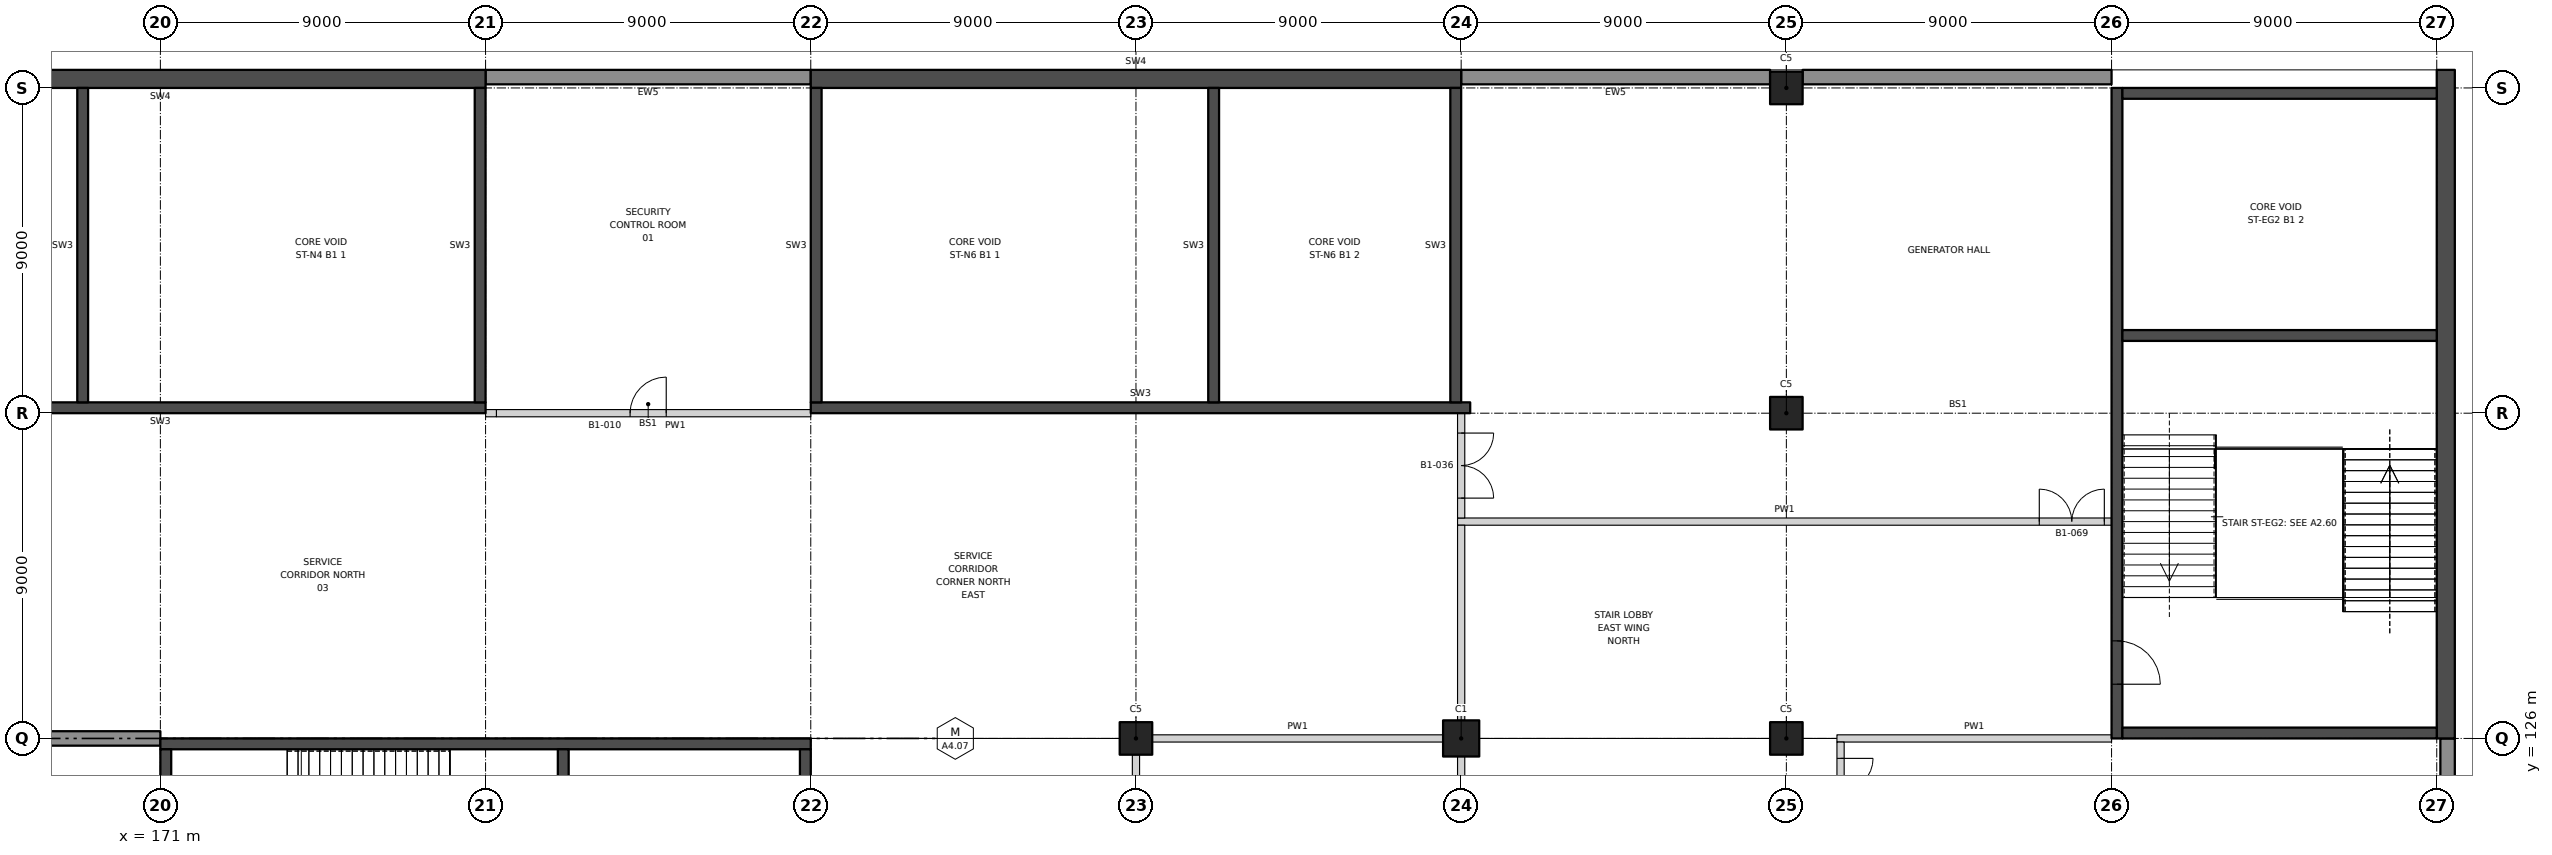
"""IFC4 building model, lengths in metres.
Left out: names, types, materials, properties, quantities, classifications, styles, units other than length and angle.
Written with IfcOpenShell. Run it as: python <this file> out.ifc"""

import sys

from ifc_helpers import new_model, si_unit, direction, frame, frame_2d, origin, origin_2d, place, context, subcontext, project, spatial, rectangle, extrude, element, fill, save


model = new_model("IFC4")
c1 = context("Model", 3, precision=1e-05, world=origin(), true_north=direction((0.0, 1.0)))
c2 = subcontext(c1, "Body", "Model", "MODEL_VIEW")
j1 = project(units=[si_unit("LENGTHUNIT", "METRE"), si_unit("PLANEANGLEUNIT", "RADIAN")], contexts=[c1])
p1 = place(None, origin())
s1 = spatial("IfcSite", under=j1, at=p1, CompositionType="ELEMENT")
p2 = place(p1, origin())
s2 = spatial("IfcBuilding", under=s1, at=p2, CompositionType="ELEMENT")
p3 = place(p2, frame((0.0, 0.0, -6.0)))
s3 = spatial("IfcBuildingStorey", under=s2, at=p3, CompositionType="ELEMENT", Elevation=-6.0)
p4 = place(p3, frame((207.0, 126.0, 0.0), z_axis=(0.0, 0.0, 1.0), x_axis=(1.0, 0.0, 0.0)))
e1 = element("IfcColumn", 1, at=p4, inside=s3, PredefinedType="COLUMN", context=c2, shape_type="SweptSolid", body=[
    extrude(rectangle(XDim=1.0, YDim=1.0, at=origin_2d()), origin(), (0.0, 0.0, 1.0), 6.0),
])
for number, where, z_axis, x_axis in (
    (2, (198.0, 126.0, 0.0), (0.0, 0.0, 1.0), (1.0, 0.0, 0.0)),
    (3, (216.0, 126.0, 0.0), (0.0, 0.0, 1.0), (1.0, 0.0, 0.0)),
    (4, (216.0, 135.0, 0.0), (0.0, 0.0, 1.0), (1.0, 0.0, 0.0)),
    (5, (216.0, 144.0, 0.0), (0.0, 0.0, 1.0), (1.0, 0.0, 0.0)),
):
    element("IfcColumn", number, at=place(p3, frame(where, z_axis=z_axis, x_axis=x_axis)), inside=s3, PredefinedType="COLUMN", context=c2, shape_type="SweptSolid", body=[
        extrude(rectangle(XDim=0.9, YDim=0.9, at=origin_2d()), origin(), (0.0, 0.0, 1.0), 6.0),
    ])
p5 = place(p3, frame((171.0, 126.0, 0.0), z_axis=(0.0, 0.0, 1.0), x_axis=(-1.0, 0.0, 0.0)))
e6 = element("IfcWall", 6, at=p5, inside=s3, PredefinedType="SOLIDWALL", context=c2, shape_type="SweptSolid", body=[
    extrude(rectangle(XDim=39.8, YDim=0.4, at=frame_2d((19.9, 0.0))), origin(), (0.0, 0.0, 1.0), 6.0),
])
p6 = place(p3, frame((198.45, 126.0, 0.0), z_axis=(0.0, 0.0, 1.0), x_axis=(1.0, 0.0, 0.0)))
e7 = element("IfcWall", 7, at=p6, inside=s3, PredefinedType="PARTITIONING", context=c2, shape_type="SweptSolid", body=[
    extrude(rectangle(XDim=8.05, YDim=0.2, at=frame_2d((4.025, 0.0))), origin(), (0.0, 0.0, 1.0), 4.65),
])
p7 = place(p3, frame((217.4, 126.0, 0.0), z_axis=(0.0, 0.0, 1.0), x_axis=(1.0, 0.0, 0.0)))
e8 = element("IfcWall", 8, at=p7, inside=s3, PredefinedType="PARTITIONING", context=c2, shape_type="SweptSolid", body=[
    extrude(rectangle(XDim=7.6, YDim=0.2, at=frame_2d((3.8, 0.0))), origin(), (0.0, 0.0, 1.0), 4.65),
])
p8 = place(p3, frame((206.9, 132.0, 0.0), z_axis=(0.0, 0.0, 1.0), x_axis=(1.0, 0.0, 0.0)))
e9 = element("IfcWall", 9, at=p8, inside=s3, PredefinedType="PARTITIONING", context=c2, shape_type="SweptSolid", body=[
    extrude(rectangle(XDim=18.1, YDim=0.2, at=frame_2d((9.05, 0.0))), origin(), (0.0, 0.0, 1.0), 6.0),
])
p9 = place(p8, frame((16.1, 0.0, 0.0)))
e10 = element("IfcOpeningElement", 10, at=p9, cuts=e9, PredefinedType="OPENING", context=c2, shape_type="SweptSolid", body=[
    extrude(rectangle(XDim=1.8, YDim=2.1, at=frame_2d((0.9, 1.05))), frame((0.0, 0.11, 0.0), z_axis=(0.0, -1.0, 0.0), x_axis=(1.0, 0.0, 0.0)), (0.0, 0.0, 1.0), 0.22),
])
p10 = place(p3, frame((180.3, 135.0, 0.0), z_axis=(0.0, 0.0, 1.0), x_axis=(1.0, 0.0, 0.0)))
e11 = element("IfcWall", 11, at=p10, inside=s3, PredefinedType="PARTITIONING", context=c2, shape_type="SweptSolid", body=[
    extrude(rectangle(XDim=8.7, YDim=0.2, at=frame_2d((4.35, 0.0))), origin(), (0.0, 0.0, 1.0), 4.55),
])
p11 = place(p10, frame((3.7, 0.0, 0.0)))
e12 = element("IfcOpeningElement", 12, at=p11, cuts=e11, PredefinedType="OPENING", context=c2, shape_type="SweptSolid", body=[
    extrude(rectangle(XDim=1.0, YDim=2.1, at=frame_2d((0.5, 1.05))), frame((0.0, 0.11, 0.0), z_axis=(0.0, -1.0, 0.0), x_axis=(1.0, 0.0, 0.0)), (0.0, 0.0, 1.0), 0.22),
])
p12 = place(p3, frame((198.0, 117.45, 0.0), z_axis=(0.0, 0.0, 1.0), x_axis=(0.0, 1.0, 0.0)))
e13 = element("IfcWall", 13, at=p12, inside=s3, PredefinedType="PARTITIONING", context=c2, shape_type="SweptSolid", body=[
    extrude(rectangle(XDim=8.1, YDim=0.2, at=frame_2d((4.05, 0.0))), origin(), (0.0, 0.0, 1.0), 4.65),
])
p13 = place(p12, frame((3.15, 0.0, 0.0)))
e14 = element("IfcOpeningElement", 14, at=p13, cuts=e13, PredefinedType="OPENING", context=c2, shape_type="SweptSolid", body=[
    extrude(rectangle(XDim=1.8, YDim=2.1, at=frame_2d((0.9, 1.05))), frame((0.0, 0.11, 0.0), z_axis=(0.0, -1.0, 0.0), x_axis=(1.0, 0.0, 0.0)), (0.0, 0.0, 1.0), 0.22),
])
p14 = place(p3, frame((207.0, 117.5, 0.0), z_axis=(0.0, 0.0, 1.0), x_axis=(0.0, 1.0, 0.0)))
e15 = element("IfcWall", 15, at=p14, inside=s3, PredefinedType="PARTITIONING", context=c2, shape_type="SweptSolid", body=[
    extrude(rectangle(XDim=8.0, YDim=0.2, at=frame_2d((4.0, 0.0))), origin(), (0.0, 0.0, 1.0), 4.65),
])
p15 = place(p3, frame((207.0, 126.5, 0.0), z_axis=(0.0, 0.0, 1.0), x_axis=(0.0, 1.0, 0.0)))
e16 = element("IfcWall", 16, at=p15, inside=s3, PredefinedType="PARTITIONING", context=c2, shape_type="SweptSolid", body=[
    extrude(rectangle(XDim=5.4, YDim=0.2, at=frame_2d((2.7, 0.0))), origin(), (0.0, 0.0, 1.0), 4.65),
])
p16 = place(p3, frame((207.0, 132.1, 0.0), z_axis=(0.0, 0.0, 1.0), x_axis=(0.0, 1.0, 0.0)))
e17 = element("IfcWall", 17, at=p16, inside=s3, PredefinedType="PARTITIONING", context=c2, shape_type="SweptSolid", body=[
    extrude(rectangle(XDim=2.9, YDim=0.2, at=frame_2d((1.45, 0.0))), origin(), (0.0, 0.0, 1.0), 4.65),
])
p17 = place(p16, frame((0.55, 0.0, 0.0)))
e18 = element("IfcOpeningElement", 18, at=p17, cuts=e17, PredefinedType="OPENING", context=c2, shape_type="SweptSolid", body=[
    extrude(rectangle(XDim=1.8, YDim=2.1, at=frame_2d((0.9, 1.05))), frame((0.0, 0.11, 0.0), z_axis=(0.0, -1.0, 0.0), x_axis=(1.0, 0.0, 0.0)), (0.0, 0.0, 1.0), 0.22),
])
p18 = place(p3, frame((217.5, 108.1, 0.0), z_axis=(0.0, 0.0, 1.0), x_axis=(0.0, 1.0, 0.0)))
e19 = element("IfcWall", 19, at=p18, inside=s3, PredefinedType="PARTITIONING", context=c2, shape_type="SweptSolid", body=[
    extrude(rectangle(XDim=17.8, YDim=0.2, at=frame_2d((8.9, 0.0))), origin(), (0.0, 0.0, 1.0), 6.0),
])
p19 = place(p18, frame((3.5, 0.0, 0.0)))
e20 = element("IfcOpeningElement", 20, at=p19, cuts=e19, PredefinedType="OPENING", context=c2, shape_type="SweptSolid", body=[
    extrude(rectangle(XDim=1.8, YDim=2.1, at=frame_2d((0.9, 1.05))), frame((0.0, 0.11, 0.0), z_axis=(0.0, -1.0, 0.0), x_axis=(1.0, 0.0, 0.0)), (0.0, 0.0, 1.0), 0.22),
])
p20 = place(p18, frame((15.548, 0.0, 0.0)))
e21 = element("IfcOpeningElement", 21, at=p20, cuts=e19, PredefinedType="OPENING", context=c2, shape_type="SweptSolid", body=[
    extrude(rectangle(XDim=1.8, YDim=2.1, at=frame_2d((0.9, 1.05))), frame((0.0, 0.11, 0.0), z_axis=(0.0, -1.0, 0.0), x_axis=(1.0, 0.0, 0.0)), (0.0, 0.0, 1.0), 0.22),
])
p21 = place(p3, frame((234.3, 117.45, 0.0), z_axis=(0.0, 0.0, 1.0), x_axis=(0.0, 1.0, 0.0)))
e22 = element("IfcWall", 22, at=p21, inside=s3, PredefinedType="SOLIDWALL", context=c2, shape_type="SweptSolid", body=[
    extrude(rectangle(XDim=8.55, YDim=0.4, at=frame_2d((4.275, 0.0))), origin(), (0.0, 0.0, 1.0), 6.0),
])
p22 = place(p3, frame((189.0, 144.3, 0.0), z_axis=(0.0, 0.0, 1.0), x_axis=(-1.0, 0.0, 0.0)))
e23 = element("IfcWall", 23, at=p22, inside=s3, PredefinedType="SOLIDWALL", context=c2, shape_type="SweptSolid", body=[
    extrude(rectangle(XDim=9.0, YDim=0.4, at=frame_2d((4.5, 0.0))), origin(), (0.0, 0.0, 1.0), 6.0),
])
for number, where, z_axis, x_axis in (
    (24, (215.55, 144.3, 0.0), (0.0, 0.0, 1.0), (-1.0, 0.0, 0.0)),
    (25, (225.0, 144.3, 0.0), (0.0, 0.0, 1.0), (-1.0, 0.0, 0.0)),
):
    element("IfcWall", number, at=place(p3, frame(where, z_axis=z_axis, x_axis=x_axis)), inside=s3, PredefinedType="SOLIDWALL", context=c2, shape_type="SweptSolid", body=[
        extrude(rectangle(XDim=8.55, YDim=0.4, at=frame_2d((4.275, 0.0))), origin(), (0.0, 0.0, 1.0), 6.0),
    ])
p23 = place(p3, frame((180.0, 135.15, 0.0), z_axis=(0.0, 0.0, 1.0), x_axis=(-1.0, 0.0, 0.0)))
e26 = element("IfcWall", 26, at=p23, inside=s3, PredefinedType="SHEAR", context=c2, shape_type="SweptSolid", body=[
    extrude(rectangle(XDim=18.0, YDim=0.3, at=frame_2d((9.0, 0.0))), origin(), (0.0, 0.0, 1.0), 6.0),
])
p24 = place(p3, frame((180.0, 144.25, 0.0), z_axis=(0.0, 0.0, 1.0), x_axis=(-1.0, 0.0, 0.0)))
e27 = element("IfcWall", 27, at=p24, inside=s3, PredefinedType="SHEAR", context=c2, shape_type="SweptSolid", body=[
    extrude(rectangle(XDim=18.0, YDim=0.5, at=frame_2d((9.0, 0.0))), origin(), (0.0, 0.0, 1.0), 6.0),
])
for number, where, z_axis, x_axis in (
    (28, (179.85, 135.3, 0.0), (0.0, 0.0, 1.0), (0.0, 1.0, 0.0)),
    (29, (168.85, 135.3, 0.0), (0.0, 0.0, 1.0), (0.0, 1.0, 0.0)),
):
    element("IfcWall", number, at=place(p3, frame(where, z_axis=z_axis, x_axis=x_axis)), inside=s3, PredefinedType="SHEAR", context=c2, shape_type="SweptSolid", body=[
        extrude(rectangle(XDim=8.7, YDim=0.3, at=frame_2d((4.35, 0.0))), origin(), (0.0, 0.0, 1.0), 6.0),
    ])
p25 = place(p3, frame((189.0, 135.15, 0.0), z_axis=(0.0, 0.0, 1.0), x_axis=(1.0, 0.0, 0.0)))
e30 = element("IfcWall", 30, at=p25, inside=s3, PredefinedType="SHEAR", context=c2, shape_type="SweptSolid", body=[
    extrude(rectangle(XDim=18.25, YDim=0.3, at=frame_2d((9.125, 0.0))), origin(), (0.0, 0.0, 1.0), 6.0),
])
p26 = place(p3, frame((189.0, 144.25, 0.0), z_axis=(0.0, 0.0, 1.0), x_axis=(1.0, 0.0, 0.0)))
e31 = element("IfcWall", 31, at=p26, inside=s3, PredefinedType="SHEAR", context=c2, shape_type="SweptSolid", body=[
    extrude(rectangle(XDim=18.0, YDim=0.5, at=frame_2d((9.0, 0.0))), origin(), (0.0, 0.0, 1.0), 6.0),
])
for number, where, z_axis, x_axis in (
    (32, (189.15, 135.3, 0.0), (0.0, 0.0, 1.0), (0.0, 1.0, 0.0)),
    (33, (206.85, 135.3, 0.0), (0.0, 0.0, 1.0), (0.0, 1.0, 0.0)),
    (34, (200.15, 135.3, 0.0), (0.0, 0.0, 1.0), (0.0, 1.0, 0.0)),
):
    element("IfcWall", number, at=place(p3, frame(where, z_axis=z_axis, x_axis=x_axis)), inside=s3, PredefinedType="SHEAR", context=c2, shape_type="SweptSolid", body=[
        extrude(rectangle(XDim=8.7, YDim=0.3, at=frame_2d((4.35, 0.0))), origin(), (0.0, 0.0, 1.0), 6.0),
    ])
p27 = place(p3, frame((171.0, 125.85, 0.0), z_axis=(0.0, 0.0, 1.0), x_axis=(1.0, 0.0, 0.0)))
e35 = element("IfcWall", 35, at=p27, inside=s3, PredefinedType="SHEAR", context=c2, shape_type="SweptSolid", body=[
    extrude(rectangle(XDim=18.0, YDim=0.3, at=frame_2d((9.0, 0.0))), origin(), (0.0, 0.0, 1.0), 6.0),
])
for number, where, z_axis, x_axis in (
    (36, (171.15, 117.3, 0.0), (0.0, 0.0, 1.0), (0.0, 1.0, 0.0)),
    (37, (188.85, 117.3, 0.0), (0.0, 0.0, 1.0), (0.0, 1.0, 0.0)),
    (38, (182.15, 117.3, 0.0), (0.0, 0.0, 1.0), (0.0, 1.0, 0.0)),
):
    element("IfcWall", number, at=place(p3, frame(where, z_axis=z_axis, x_axis=x_axis)), inside=s3, PredefinedType="SHEAR", context=c2, shape_type="SweptSolid", body=[
        extrude(rectangle(XDim=8.4, YDim=0.3, at=frame_2d((4.2, 0.0))), origin(), (0.0, 0.0, 1.0), 6.0),
    ])
p28 = place(p3, frame((225.15, 126.0, 0.0), z_axis=(0.0, 0.0, 1.0), x_axis=(0.0, 1.0, 0.0)))
e39 = element("IfcWall", 39, at=p28, inside=s3, PredefinedType="SHEAR", context=c2, shape_type="SweptSolid", body=[
    extrude(rectangle(XDim=18.0, YDim=0.3, at=frame_2d((9.0, 0.0))), origin(), (0.0, 0.0, 1.0), 6.0),
])
p29 = place(p28, frame((1.5, 0.0, 0.0)))
e40 = element("IfcOpeningElement", 40, at=p29, cuts=e39, PredefinedType="OPENING", context=c2, shape_type="SweptSolid", body=[
    extrude(rectangle(XDim=1.2, YDim=2.1, at=frame_2d((0.6, 1.05))), frame((0.0, 0.16, 0.0), z_axis=(0.0, -1.0, 0.0), x_axis=(1.0, 0.0, 0.0)), (0.0, 0.0, 1.0), 0.32),
])
p30 = place(p3, frame((234.25, 126.0, 0.0), z_axis=(0.0, 0.0, 1.0), x_axis=(0.0, 1.0, 0.0)))
e41 = element("IfcWall", 41, at=p30, inside=s3, PredefinedType="SHEAR", context=c2, shape_type="SweptSolid", body=[
    extrude(rectangle(XDim=18.5, YDim=0.5, at=frame_2d((9.25, 0.0))), origin(), (0.0, 0.0, 1.0), 6.0),
])
for number, where, z_axis, x_axis in (
    (42, (225.3, 126.15, 0.0), (0.0, 0.0, 1.0), (1.0, 0.0, 0.0)),
    (43, (225.3, 143.85, 0.0), (0.0, 0.0, 1.0), (1.0, 0.0, 0.0)),
    (44, (225.3, 137.15, 0.0), (0.0, 0.0, 1.0), (1.0, 0.0, 0.0)),
):
    element("IfcWall", number, at=place(p3, frame(where, z_axis=z_axis, x_axis=x_axis)), inside=s3, PredefinedType="SHEAR", context=c2, shape_type="SweptSolid", body=[
        extrude(rectangle(XDim=8.7, YDim=0.3, at=frame_2d((4.35, 0.0))), origin(), (0.0, 0.0, 1.0), 6.0),
    ])
p31 = place(p3, frame((180.0, 135.0, 0.0), z_axis=(0.0, 0.0, 1.0), x_axis=(1.0, 0.0, 0.0)))
e45 = element("IfcWall", 45, at=p31, inside=s3, PredefinedType="PARTITIONING", context=c2, shape_type="SweptSolid", body=[
    extrude(rectangle(XDim=0.3, YDim=0.2, at=frame_2d((0.15, 0.0))), origin(), (0.0, 0.0, 1.0), 6.0),
])
p32 = place(p11, origin())
e46 = element("IfcDoor", 46, at=p32, inside=s3, OperationType="SINGLE_SWING_RIGHT", PredefinedType="DOOR", context=c2, shape_type="SweptSolid", body=[
    extrude(rectangle(XDim=1.0, YDim=2.1, at=frame_2d((0.5, 1.05))), frame((0.0, 0.025, 0.0), z_axis=(0.0, -1.0, 0.0), x_axis=(1.0, 0.0, 0.0)), (0.0, 0.0, 1.0), 0.05),
])
fill(e12, e46)
p33 = place(p17, frame((1.8, 0.0, 0.0), z_axis=(0.0, 0.0, 1.0), x_axis=(-1.0, 0.0, 0.0)))
e47 = element("IfcDoor", 47, at=p33, inside=s3, OperationType="DOUBLE_DOOR_DOUBLE_SWING", PredefinedType="DOOR", context=c2, shape_type="SweptSolid", body=[
    extrude(rectangle(XDim=1.8, YDim=2.1, at=frame_2d((0.9, 1.05))), frame((0.0, 0.025, 0.0), z_axis=(0.0, -1.0, 0.0), x_axis=(1.0, 0.0, 0.0)), (0.0, 0.0, 1.0), 0.05),
])
fill(e18, e47)
p34 = place(p20, frame((1.8, 0.0, 0.0), z_axis=(0.0, 0.0, 1.0), x_axis=(-1.0, 0.0, 0.0)))
e48 = element("IfcDoor", 48, at=p34, inside=s3, OperationType="DOUBLE_DOOR_DOUBLE_SWING", PredefinedType="DOOR", context=c2, shape_type="SweptSolid", body=[
    extrude(rectangle(XDim=1.8, YDim=2.1, at=frame_2d((0.9, 1.05))), frame((0.0, 0.025, 0.0), z_axis=(0.0, -1.0, 0.0), x_axis=(1.0, 0.0, 0.0)), (0.0, 0.0, 1.0), 0.05),
])
fill(e21, e48)
p35 = place(p9, origin())
e49 = element("IfcDoor", 49, at=p35, inside=s3, OperationType="DOUBLE_DOOR_DOUBLE_SWING", PredefinedType="DOOR", context=c2, shape_type="SweptSolid", body=[
    extrude(rectangle(XDim=1.8, YDim=2.1, at=frame_2d((0.9, 1.05))), frame((0.0, 0.025, 0.0), z_axis=(0.0, -1.0, 0.0), x_axis=(1.0, 0.0, 0.0)), (0.0, 0.0, 1.0), 0.05),
])
fill(e10, e49)
p36 = place(p29, frame((1.2, 0.0, 0.0), z_axis=(0.0, 0.0, 1.0), x_axis=(-1.0, 0.0, 0.0)))
e50 = element("IfcDoor", 50, at=p36, inside=s3, OperationType="SINGLE_SWING_RIGHT", PredefinedType="DOOR", context=c2, shape_type="SweptSolid", body=[
    extrude(rectangle(XDim=1.2, YDim=2.1, at=frame_2d((0.6, 1.05))), frame((0.0, 0.025, 0.0), z_axis=(0.0, -1.0, 0.0), x_axis=(1.0, 0.0, 0.0)), (0.0, 0.0, 1.0), 0.05),
])
fill(e40, e50)
save(model, sys.argv[1])
